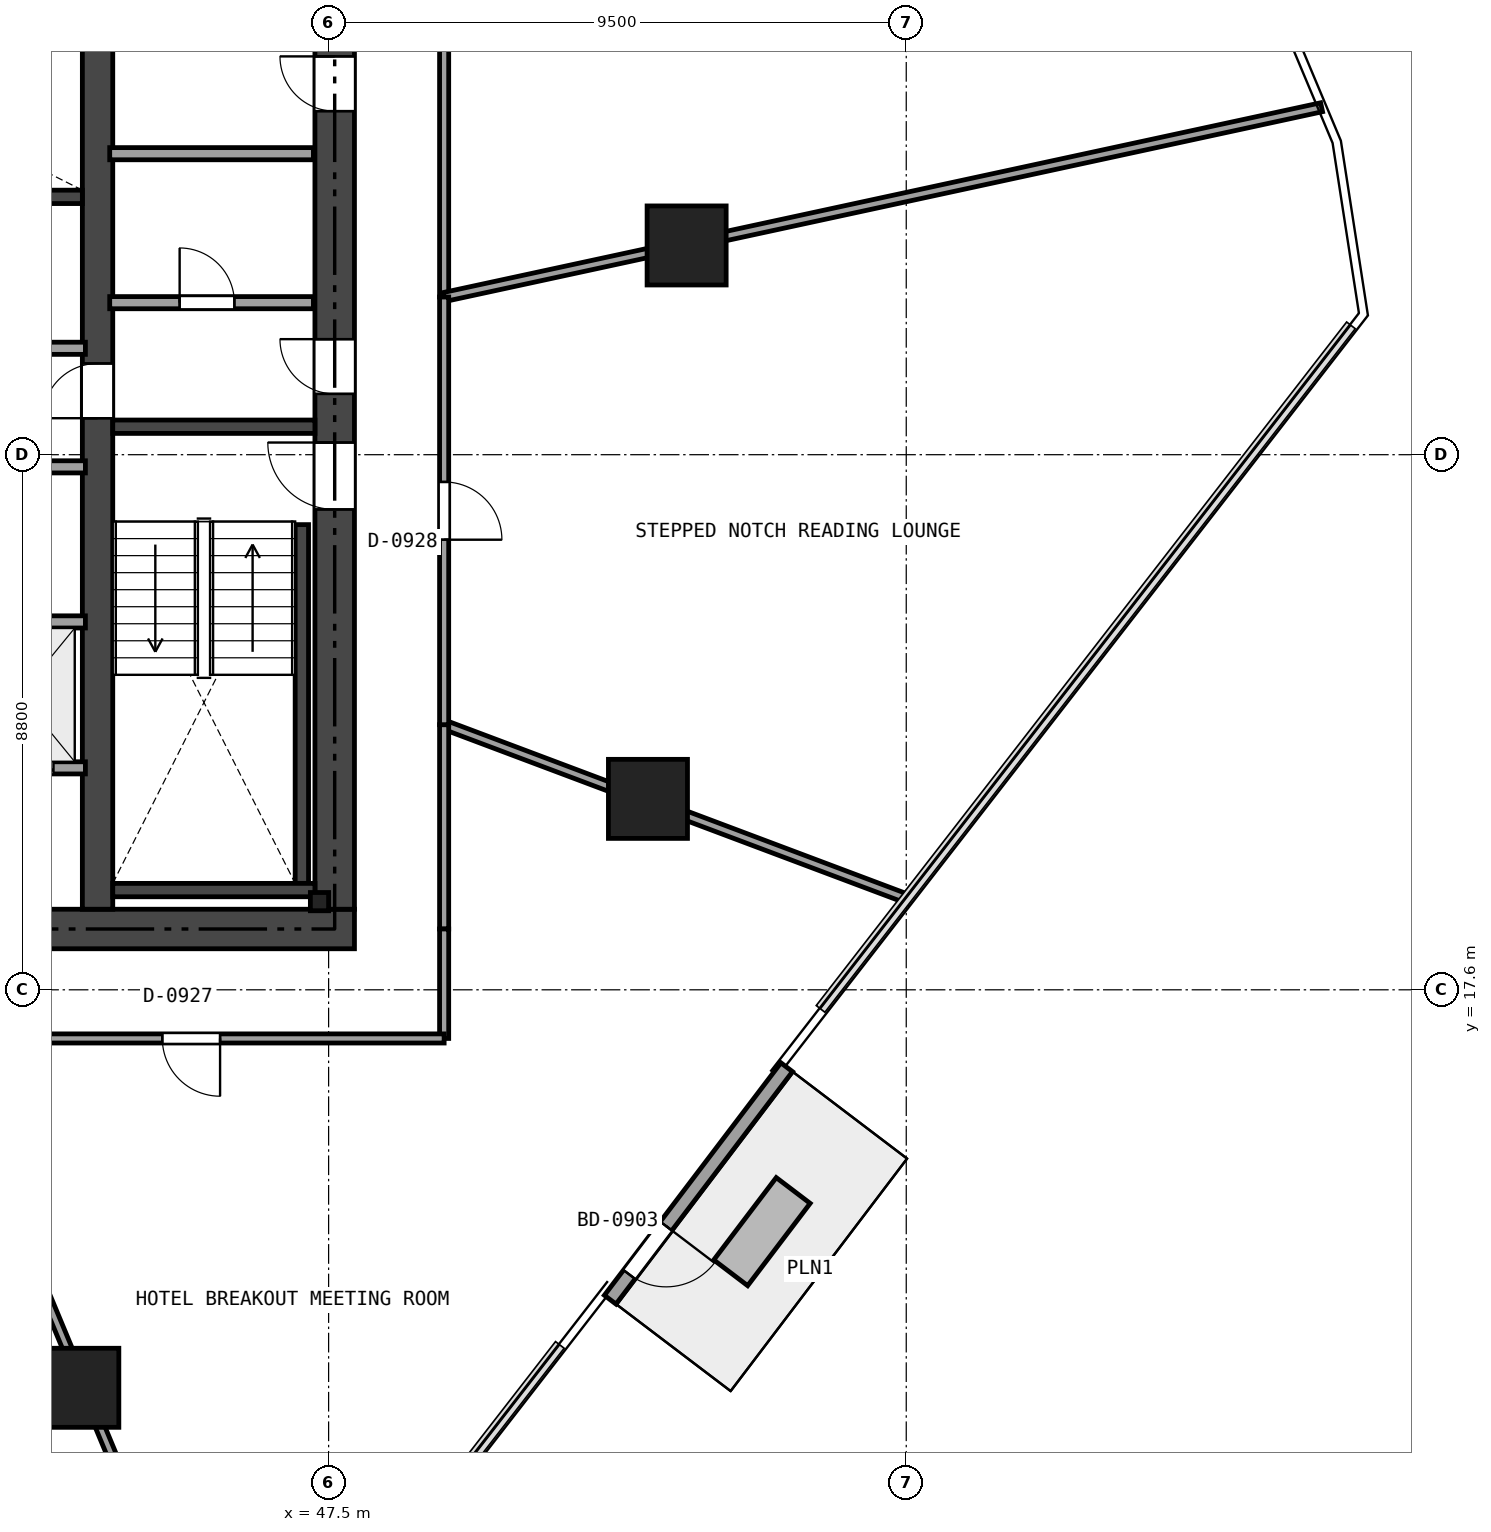
"""IFC4 building model, lengths in metres.
Left out: names, types, materials, properties, quantities, classifications, styles, units other than length and angle.
Written with IfcOpenShell. Run it as: python <this file> out.ifc"""

import sys

from ifc_helpers import new_model, si_unit, direction, frame, frame_2d, origin, origin_2d, place, context, subcontext, project, spatial, rectangle, i_section, extrude, element, fill, save


model = new_model("IFC4")
c1 = context("Model", 3, precision=1e-05, world=origin(), true_north=direction((0.0, 1.0)))
c2 = subcontext(c1, "Body", "Model", "MODEL_VIEW")
j1 = project(units=[si_unit("LENGTHUNIT", "METRE"), si_unit("PLANEANGLEUNIT", "RADIAN")], contexts=[c1])
p1 = place(None, origin())
s1 = spatial("IfcSite", under=j1, at=p1, CompositionType="ELEMENT")
p2 = place(p1, origin())
s2 = spatial("IfcBuilding", under=s1, at=p2, CompositionType="ELEMENT")
p3 = place(p2, frame((0.0, 0.0, 40.8)))
s3 = spatial("IfcBuildingStorey", under=s2, at=p3, CompositionType="ELEMENT", Elevation=40.8)
p4 = place(p3, frame((26.475, 18.6, 0.0), z_axis=(0.0, 0.0, 1.0), x_axis=(1.0, 0.0, 0.0)))
e1 = element("IfcWall", 1, at=p4, inside=s3, PredefinedType="SHEAR", context=c2, shape_type="SweptSolid", body=[
    extrude(rectangle(XDim=21.45, YDim=0.65, at=frame_2d((10.725, 0.0))), origin(), (0.0, 0.0, 1.0), 3.17),
])
p5 = place(p4, frame((12.45, 0.0, 0.0)))
e2 = element("IfcOpeningElement", 2, at=p5, cuts=e1, PredefinedType="OPENING", context=c2, shape_type="SweptSolid", body=[
    extrude(rectangle(XDim=1.15, YDim=2.15, at=frame_2d((0.575, 1.075))), frame((0.0, 0.335, 0.0), z_axis=(0.0, -1.0, 0.0), x_axis=(1.0, 0.0, 0.0)), (0.0, 0.0, 1.0), 0.67),
])
p6 = place(p4, frame((5.275, 0.0, 0.0)))
e3 = element("IfcOpeningElement", 3, at=p6, cuts=e1, PredefinedType="OPENING", context=c2, shape_type="SweptSolid", body=[
    extrude(rectangle(XDim=0.9, YDim=2.1, at=frame_2d((0.45, 1.05))), frame((0.0, 0.335, 0.0), z_axis=(0.0, -1.0, 0.0), x_axis=(1.0, 0.0, 0.0)), (0.0, 0.0, 1.0), 0.67),
])
p7 = place(p3, frame((47.6, 18.925, 0.0), z_axis=(0.0, 0.0, 1.0), x_axis=(0.0, 1.0, 0.0)))
e4 = element("IfcWall", 4, at=p7, inside=s3, PredefinedType="SHEAR", context=c2, shape_type="SweptSolid", body=[
    extrude(rectangle(XDim=14.95, YDim=0.65, at=frame_2d((7.475, 0.0))), origin(), (0.0, 0.0, 1.0), 3.17),
])
p8 = place(p7, frame((6.575, 0.0, 0.0)))
e5 = element("IfcOpeningElement", 5, at=p8, cuts=e4, PredefinedType="OPENING", context=c2, shape_type="SweptSolid", body=[
    extrude(rectangle(XDim=1.1, YDim=2.15, at=frame_2d((0.55, 1.075))), frame((0.0, 0.335, 0.0), z_axis=(0.0, -1.0, 0.0), x_axis=(1.0, 0.0, 0.0)), (0.0, 0.0, 1.0), 0.67),
])
p9 = place(p7, frame((8.475, 0.0, 0.0)))
e6 = element("IfcOpeningElement", 6, at=p9, cuts=e4, PredefinedType="OPENING", context=c2, shape_type="SweptSolid", body=[
    extrude(rectangle(XDim=0.9, YDim=2.1, at=frame_2d((0.45, 1.05))), frame((0.0, 0.335, 0.0), z_axis=(0.0, -1.0, 0.0), x_axis=(1.0, 0.0, 0.0)), (0.0, 0.0, 1.0), 0.67),
])
p10 = place(p7, frame((13.125, 0.0, 0.0)))
e7 = element("IfcOpeningElement", 7, at=p10, cuts=e4, PredefinedType="OPENING", context=c2, shape_type="SweptSolid", body=[
    extrude(rectangle(XDim=0.9, YDim=2.1, at=frame_2d((0.45, 1.05))), frame((0.0, 0.335, 0.0), z_axis=(0.0, -1.0, 0.0), x_axis=(1.0, 0.0, 0.0)), (0.0, 0.0, 1.0), 0.67),
])
p11 = place(p3, frame((43.7, 18.925, 0.0), z_axis=(0.0, 0.0, 1.0), x_axis=(0.0, 1.0, 0.0)))
e8 = element("IfcWall", 8, at=p11, inside=s3, PredefinedType="SHEAR", context=c2, shape_type="SweptSolid", body=[
    extrude(rectangle(XDim=14.95, YDim=0.5, at=frame_2d((7.475, 0.0))), origin(), (0.0, 0.0, 1.0), 3.17),
])
p12 = place(p11, frame((8.075, 0.0, 0.0)))
e9 = element("IfcOpeningElement", 9, at=p12, cuts=e8, PredefinedType="OPENING", context=c2, shape_type="SweptSolid", body=[
    extrude(rectangle(XDim=0.9, YDim=2.1, at=frame_2d((0.45, 1.05))), frame((0.0, 0.26, 0.0), z_axis=(0.0, -1.0, 0.0), x_axis=(1.0, 0.0, 0.0)), (0.0, 0.0, 1.0), 0.52),
])
p13 = place(p3, frame((43.95, 26.86, 0.0), z_axis=(0.0, 0.0, 1.0), x_axis=(1.0, 0.0, 0.0)))
e10 = element("IfcWall", 10, at=p13, inside=s3, PredefinedType="SHEAR", context=c2, shape_type="SweptSolid", body=[
    extrude(rectangle(XDim=3.325, YDim=0.22, at=frame_2d((1.663, 0.0))), origin(), (0.0, 0.0, 1.0), 3.17),
])
p14 = place(p3, frame((47.06, 19.35, 0.0), z_axis=(0.0, 0.0, 1.0), x_axis=(0.0, 1.0, 0.0)))
e11 = element("IfcWall", 11, at=p14, inside=s3, PredefinedType="SHEAR", context=c2, shape_type="SweptSolid", body=[
    extrude(rectangle(XDim=5.9, YDim=0.22, at=frame_2d((2.95, 0.0))), origin(), (0.0, 0.0, 1.0), 3.17),
])
p15 = place(p3, frame((43.95, 19.24, 0.0), z_axis=(0.0, 0.0, 1.0), x_axis=(1.0, 0.0, 0.0)))
e12 = element("IfcWall", 12, at=p15, inside=s3, PredefinedType="SHEAR", context=c2, shape_type="SweptSolid", body=[
    extrude(rectangle(XDim=3.325, YDim=0.22, at=frame_2d((1.663, 0.0))), origin(), (0.0, 0.0, 1.0), 3.17),
])
p16 = place(p3, frame((35.84, 30.64, 0.0), z_axis=(0.0, 0.0, 1.0), x_axis=(1.0, 0.0, 0.0)))
e13 = element("IfcWall", 13, at=p16, inside=s3, PredefinedType="SHEAR", context=c2, shape_type="SweptSolid", body=[
    extrude(rectangle(XDim=7.61, YDim=0.22, at=frame_2d((3.805, 0.0))), origin(), (0.0, 0.0, 1.0), 3.17),
])
for number, where, z_axis, x_axis in (
    (14, (53.388, 29.841, 0.0), (0.0, 0.0, 1.0), (1.0, 0.0, 0.0)),
    (15, (43.4, 11.055, 0.0), (0.0, 0.0, 1.0), (1.0, 0.0, 0.0)),
    (16, (52.752, 20.74, 0.0), (0.0, 0.0, 1.0), (1.0, 0.0, 0.0)),
):
    element("IfcColumn", number, at=place(p3, frame(where, z_axis=z_axis, x_axis=x_axis)), inside=s3, PredefinedType="COLUMN", context=c2, shape_type="SweptSolid", body=[
        extrude(rectangle(XDim=1.3, YDim=1.3, at=origin_2d()), origin(), (0.0, 0.0, 1.0), 3.17),
    ])
p17 = place(p3, frame((47.35, 19.05, 0.0), z_axis=(0.0, 0.0, 1.0), x_axis=(1.0, 0.0, 0.0)))
e17 = element("IfcColumn", 17, at=p17, inside=s3, PredefinedType="PILASTER", context=c2, shape_type="SweptSolid", body=[
    extrude(i_section(OverallWidth=0.3, OverallDepth=0.3, WebThickness=0.011, FlangeThickness=0.019, at=origin_2d()), origin(), (0.0, 0.0, 1.0), 3.17),
])
p18 = place(p3, frame((55.034, 16.327, 0.0), z_axis=(0.0, 0.0, 1.0), x_axis=(-0.604733735357, -0.796427717574, 0.0)))
e18 = element("IfcWall", 18, at=p18, inside=s3, PredefinedType="SOLIDWALL", context=c2, shape_type="SweptSolid", body=[
    extrude(rectangle(XDim=4.8, YDim=0.24, at=frame_2d((2.4, 0.0))), origin(), (0.0, 0.0, 1.0), 3.17),
])
p19 = place(p18, frame((3.28, 0.0, 0.0)))
e19 = element("IfcOpeningElement", 19, at=p19, cuts=e18, PredefinedType="OPENING", context=c2, shape_type="SweptSolid", body=[
    extrude(rectangle(XDim=1.0, YDim=2.15, at=frame_2d((0.5, 1.075))), frame((0.0, 0.13, 0.0), z_axis=(0.0, -1.0, 0.0), x_axis=(1.0, 0.0, 0.0)), (0.0, 0.0, 1.0), 0.26),
])
p20 = place(p3, frame((43.9, 28.9, 0.0), z_axis=(0.0, 0.0, 1.0), x_axis=(1.0, 0.0, 0.0)))
e20 = element("IfcWall", 20, at=p20, inside=s3, PredefinedType="SOLIDWALL", context=c2, shape_type="SweptSolid", body=[
    extrude(rectangle(XDim=3.35, YDim=0.2, at=frame_2d((1.675, 0.0))), origin(), (0.0, 0.0, 1.0), 3.17),
])
p21 = place(p20, frame((1.15, 0.0, 0.0)))
e21 = element("IfcOpeningElement", 21, at=p21, cuts=e20, PredefinedType="OPENING", context=c2, shape_type="SweptSolid", body=[
    extrude(rectangle(XDim=0.9, YDim=2.1, at=frame_2d((0.45, 1.05))), frame((0.0, 0.11, 0.0), z_axis=(0.0, -1.0, 0.0), x_axis=(1.0, 0.0, 0.0)), (0.0, 0.0, 1.0), 0.22),
])
p22 = place(p3, frame((43.9, 31.35, 0.0), z_axis=(0.0, 0.0, 1.0), x_axis=(1.0, 0.0, 0.0)))
e22 = element("IfcWall", 22, at=p22, inside=s3, PredefinedType="SOLIDWALL", context=c2, shape_type="SweptSolid", body=[
    extrude(rectangle(XDim=3.35, YDim=0.2, at=frame_2d((1.675, 0.0))), origin(), (0.0, 0.0, 1.0), 3.17),
])
for number, where, z_axis, x_axis in (
    (23, (35.62, 28.15, 0.0), (0.0, 0.0, 1.0), (1.0, 0.0, 0.0)),
    (24, (35.62, 26.2, 0.0), (0.0, 0.0, 1.0), (1.0, 0.0, 0.0)),
):
    element("IfcWall", number, at=place(p3, frame(where, z_axis=z_axis, x_axis=x_axis)), inside=s3, PredefinedType="SOLIDWALL", context=c2, shape_type="SweptSolid", body=[
        extrude(rectangle(XDim=7.88, YDim=0.2, at=frame_2d((3.94, 0.0))), origin(), (0.0, 0.0, 1.0), 3.17),
    ])
p23 = place(p3, frame((35.62, 23.65, 0.0), z_axis=(0.0, 0.0, 1.0), x_axis=(1.0, 0.0, 0.0)))
e25 = element("IfcWall", 25, at=p23, inside=s3, PredefinedType="SOLIDWALL", context=c2, shape_type="SweptSolid", body=[
    extrude(rectangle(XDim=7.88, YDim=0.2, at=frame_2d((3.94, 0.0))), origin(), (0.0, 0.0, 1.0), 2.691),
])
p24 = place(p3, frame((35.62, 21.25, 0.0), z_axis=(0.0, 0.0, 1.0), x_axis=(1.0, 0.0, 0.0)))
e26 = element("IfcWall", 26, at=p24, inside=s3, PredefinedType="SOLIDWALL", context=c2, shape_type="SweptSolid", body=[
    extrude(rectangle(XDim=7.88, YDim=0.2, at=frame_2d((3.94, 0.0))), origin(), (0.0, 0.0, 1.0), 3.17),
])
p25 = place(p24, frame((0.405, 0.0, 0.0)))
e27 = element("IfcOpeningElement", 27, at=p25, cuts=e26, PredefinedType="OPENING", context=c2, shape_type="SweptSolid", body=[
    extrude(rectangle(XDim=1.1, YDim=2.15, at=frame_2d((0.55, 1.075))), frame((0.0, 0.11, 0.0), z_axis=(0.0, -1.0, 0.0), x_axis=(1.0, 0.0, 0.0)), (0.0, 0.0, 1.0), 0.22),
])
p26 = place(p24, frame((2.355, 0.0, 0.0)))
e28 = element("IfcOpeningElement", 28, at=p26, cuts=e26, PredefinedType="OPENING", context=c2, shape_type="SweptSolid", body=[
    extrude(rectangle(XDim=1.1, YDim=2.15, at=frame_2d((0.55, 1.075))), frame((0.0, 0.11, 0.0), z_axis=(0.0, -1.0, 0.0), x_axis=(1.0, 0.0, 0.0)), (0.0, 0.0, 1.0), 0.22),
])
p27 = place(p24, frame((4.305, 0.0, 0.0)))
e29 = element("IfcOpeningElement", 29, at=p27, cuts=e26, PredefinedType="OPENING", context=c2, shape_type="SweptSolid", body=[
    extrude(rectangle(XDim=1.1, YDim=2.15, at=frame_2d((0.55, 1.075))), frame((0.0, 0.11, 0.0), z_axis=(0.0, -1.0, 0.0), x_axis=(1.0, 0.0, 0.0)), (0.0, 0.0, 1.0), 0.22),
])
p28 = place(p24, frame((6.255, 0.0, 0.0)))
e30 = element("IfcOpeningElement", 30, at=p28, cuts=e26, PredefinedType="OPENING", context=c2, shape_type="SweptSolid", body=[
    extrude(rectangle(XDim=1.1, YDim=2.15, at=frame_2d((0.55, 1.075))), frame((0.0, 0.11, 0.0), z_axis=(0.0, -1.0, 0.0), x_axis=(1.0, 0.0, 0.0)), (0.0, 0.0, 1.0), 0.22),
])
p29 = place(p3, frame((49.4, 34.2, 0.0), z_axis=(0.0, 0.0, 1.0), x_axis=(0.0, -1.0, 0.0)))
e31 = element("IfcWall", 31, at=p29, inside=s3, PredefinedType="PARTITIONING", context=c2, shape_type="SweptSolid", body=[
    extrude(rectangle(XDim=5.207, YDim=0.15, at=frame_2d((2.604, 0.0))), origin(), (0.0, 0.0, 1.0), 2.395),
])
p30 = place(p3, frame((49.4, 28.993, 0.0), z_axis=(0.0, 0.0, 1.0), x_axis=(0.977402348029, 0.211387440656, 0.0)))
e32 = element("IfcWall", 32, at=p30, inside=s3, PredefinedType="PARTITIONING", context=c2, shape_type="SweptSolid", body=[
    extrude(rectangle(XDim=14.765, YDim=0.15, at=frame_2d((7.382, 0.0))), origin(), (0.0, 0.0, 1.0), 2.395),
])
p31 = place(p3, frame((46.04, 4.895, 0.0), z_axis=(0.0, 0.0, 1.0), x_axis=(-0.384648987158, 0.9230629213, 0.0)))
e33 = element("IfcWall", 33, at=p31, inside=s3, PredefinedType="PARTITIONING", context=c2, shape_type="SweptSolid", body=[
    extrude(rectangle(XDim=12.897, YDim=0.15, at=frame_2d((6.449, 0.0))), origin(), (0.0, 0.0, 1.0), 2.395),
])
p32 = place(p3, frame((57.044, 19.087, 0.0), z_axis=(0.0, 0.0, 1.0), x_axis=(-0.936065987827, 0.351824482426, 0.0)))
e34 = element("IfcWall", 34, at=p32, inside=s3, PredefinedType="PARTITIONING", context=c2, shape_type="SweptSolid", body=[
    extrude(rectangle(XDim=8.166, YDim=0.15, at=frame_2d((4.083, 0.0))), origin(), (0.0, 0.0, 1.0), 2.395),
])
p33 = place(p3, frame((49.4, 21.96, 0.0), z_axis=(0.0, 0.0, 1.0), x_axis=(0.0, -1.0, 0.0)))
e35 = element("IfcWall", 35, at=p33, inside=s3, PredefinedType="PARTITIONING", context=c2, shape_type="SweptSolid", body=[
    extrude(rectangle(XDim=3.36, YDim=0.15, at=frame_2d((1.68, 0.0))), origin(), (0.0, 0.0, 1.0), 2.395),
])
p34 = place(p3, frame((49.4, 18.6, 0.0), z_axis=(0.0, 0.0, 1.0), x_axis=(0.0, -1.0, 0.0)))
e36 = element("IfcWall", 36, at=p34, inside=s3, PredefinedType="PARTITIONING", context=c2, shape_type="SweptSolid", body=[
    extrude(rectangle(XDim=1.8, YDim=0.15, at=frame_2d((0.9, 0.0))), origin(), (0.0, 0.0, 1.0), 2.355),
])
p35 = place(p3, frame((49.4, 16.8, 0.0), z_axis=(0.0, 0.0, 1.0), x_axis=(-1.0, 0.0, 0.0)))
e37 = element("IfcWall", 37, at=p35, inside=s3, PredefinedType="PARTITIONING", context=c2, shape_type="SweptSolid", body=[
    extrude(rectangle(XDim=8.321, YDim=0.15, at=frame_2d((4.16, 0.0))), origin(), (0.0, 0.0, 1.0), 2.355),
])
p36 = place(p35, frame((3.685, 0.0, 0.0)))
e38 = element("IfcOpeningElement", 38, at=p36, cuts=e37, PredefinedType="OPENING", context=c2, shape_type="SweptSolid", body=[
    extrude(rectangle(XDim=0.95, YDim=2.15, at=frame_2d((0.475, 1.075))), frame((0.0, 0.085, 0.0), z_axis=(0.0, -1.0, 0.0), x_axis=(1.0, 0.0, 0.0)), (0.0, 0.0, 1.0), 0.17),
])
p37 = place(p3, frame((49.4, 28.993, 0.0), z_axis=(0.0, 0.0, 1.0), x_axis=(0.0, -1.0, 0.0)))
e39 = element("IfcWall", 39, at=p37, inside=s3, PredefinedType="PARTITIONING", context=c2, shape_type="SweptSolid", body=[
    extrude(rectangle(XDim=7.033, YDim=0.15, at=frame_2d((3.517, 0.0))), origin(), (0.0, 0.0, 1.0), 2.395),
])
p38 = place(p37, frame((3.041, 0.0, 0.0)))
e40 = element("IfcOpeningElement", 40, at=p38, cuts=e39, PredefinedType="OPENING", context=c2, shape_type="SweptSolid", body=[
    extrude(rectangle(XDim=0.95, YDim=2.15, at=frame_2d((0.475, 1.075))), frame((0.0, 0.085, 0.0), z_axis=(0.0, -1.0, 0.0), x_axis=(1.0, 0.0, 0.0)), (0.0, 0.0, 1.0), 0.17),
])
p39 = place(p19, origin())
e41 = element("IfcDoor", 41, at=p39, inside=s3, OperationType="SINGLE_SWING_LEFT", PredefinedType="DOOR", context=c2, shape_type="SweptSolid", body=[
    extrude(rectangle(XDim=1.0, YDim=2.15, at=frame_2d((0.5, 1.075))), frame((0.0, 0.025, 0.0), z_axis=(0.0, -1.0, 0.0), x_axis=(1.0, 0.0, 0.0)), (0.0, 0.0, 1.0), 0.05),
])
fill(e19, e41)
p40 = place(p8, origin())
e42 = element("IfcDoor", 42, at=p40, inside=s3, OperationType="SINGLE_SWING_RIGHT", PredefinedType="DOOR", context=c2, shape_type="SweptSolid", body=[
    extrude(rectangle(XDim=1.1, YDim=2.15, at=frame_2d((0.55, 1.075))), frame((0.0, 0.025, 0.0), z_axis=(0.0, -1.0, 0.0), x_axis=(1.0, 0.0, 0.0)), (0.0, 0.0, 1.0), 0.05),
])
fill(e5, e42)
p41 = place(p12, origin())
e43 = element("IfcDoor", 43, at=p41, inside=s3, OperationType="SINGLE_SWING_LEFT", PredefinedType="DOOR", context=c2, shape_type="SweptSolid", body=[
    extrude(rectangle(XDim=0.9, YDim=2.1, at=frame_2d((0.45, 1.05))), frame((0.0, 0.025, 0.0), z_axis=(0.0, -1.0, 0.0), x_axis=(1.0, 0.0, 0.0)), (0.0, 0.0, 1.0), 0.05),
])
fill(e9, e43)
p42 = place(p9, origin())
e44 = element("IfcDoor", 44, at=p42, inside=s3, OperationType="SINGLE_SWING_RIGHT", PredefinedType="DOOR", context=c2, shape_type="SweptSolid", body=[
    extrude(rectangle(XDim=0.9, YDim=2.1, at=frame_2d((0.45, 1.05))), frame((0.0, 0.025, 0.0), z_axis=(0.0, -1.0, 0.0), x_axis=(1.0, 0.0, 0.0)), (0.0, 0.0, 1.0), 0.05),
])
fill(e6, e44)
p43 = place(p21, origin())
e45 = element("IfcDoor", 45, at=p43, inside=s3, OperationType="SINGLE_SWING_LEFT", PredefinedType="DOOR", context=c2, shape_type="SweptSolid", body=[
    extrude(rectangle(XDim=0.9, YDim=2.1, at=frame_2d((0.45, 1.05))), frame((0.0, 0.025, 0.0), z_axis=(0.0, -1.0, 0.0), x_axis=(1.0, 0.0, 0.0)), (0.0, 0.0, 1.0), 0.05),
])
fill(e21, e45)
p44 = place(p10, origin())
e46 = element("IfcDoor", 46, at=p44, inside=s3, OperationType="SINGLE_SWING_RIGHT", PredefinedType="DOOR", context=c2, shape_type="SweptSolid", body=[
    extrude(rectangle(XDim=0.9, YDim=2.1, at=frame_2d((0.45, 1.05))), frame((0.0, 0.025, 0.0), z_axis=(0.0, -1.0, 0.0), x_axis=(1.0, 0.0, 0.0)), (0.0, 0.0, 1.0), 0.05),
])
fill(e7, e46)
p45 = place(p28, origin())
e47 = element("IfcDoor", 47, at=p45, inside=s3, OperationType="SLIDING_TO_LEFT", PredefinedType="DOOR", context=c2, shape_type="SweptSolid", body=[
    extrude(rectangle(XDim=1.1, YDim=2.15, at=frame_2d((0.55, 1.075))), frame((0.0, 0.025, 0.0), z_axis=(0.0, -1.0, 0.0), x_axis=(1.0, 0.0, 0.0)), (0.0, 0.0, 1.0), 0.05),
])
fill(e30, e47)
p46 = place(p36, origin())
e48 = element("IfcDoor", 48, at=p46, inside=s3, OperationType="SINGLE_SWING_LEFT", PredefinedType="DOOR", context=c2, shape_type="SweptSolid", body=[
    extrude(rectangle(XDim=0.95, YDim=2.15, at=frame_2d((0.475, 1.075))), frame((0.0, 0.025, 0.0), z_axis=(0.0, -1.0, 0.0), x_axis=(1.0, 0.0, 0.0)), (0.0, 0.0, 1.0), 0.05),
])
fill(e38, e48)
p47 = place(p38, origin())
e49 = element("IfcDoor", 49, at=p47, inside=s3, OperationType="SINGLE_SWING_RIGHT", PredefinedType="DOOR", context=c2, shape_type="SweptSolid", body=[
    extrude(rectangle(XDim=0.95, YDim=2.15, at=frame_2d((0.475, 1.075))), frame((0.0, 0.025, 0.0), z_axis=(0.0, -1.0, 0.0), x_axis=(1.0, 0.0, 0.0)), (0.0, 0.0, 1.0), 0.05),
])
fill(e40, e49)
save(model, sys.argv[1])
